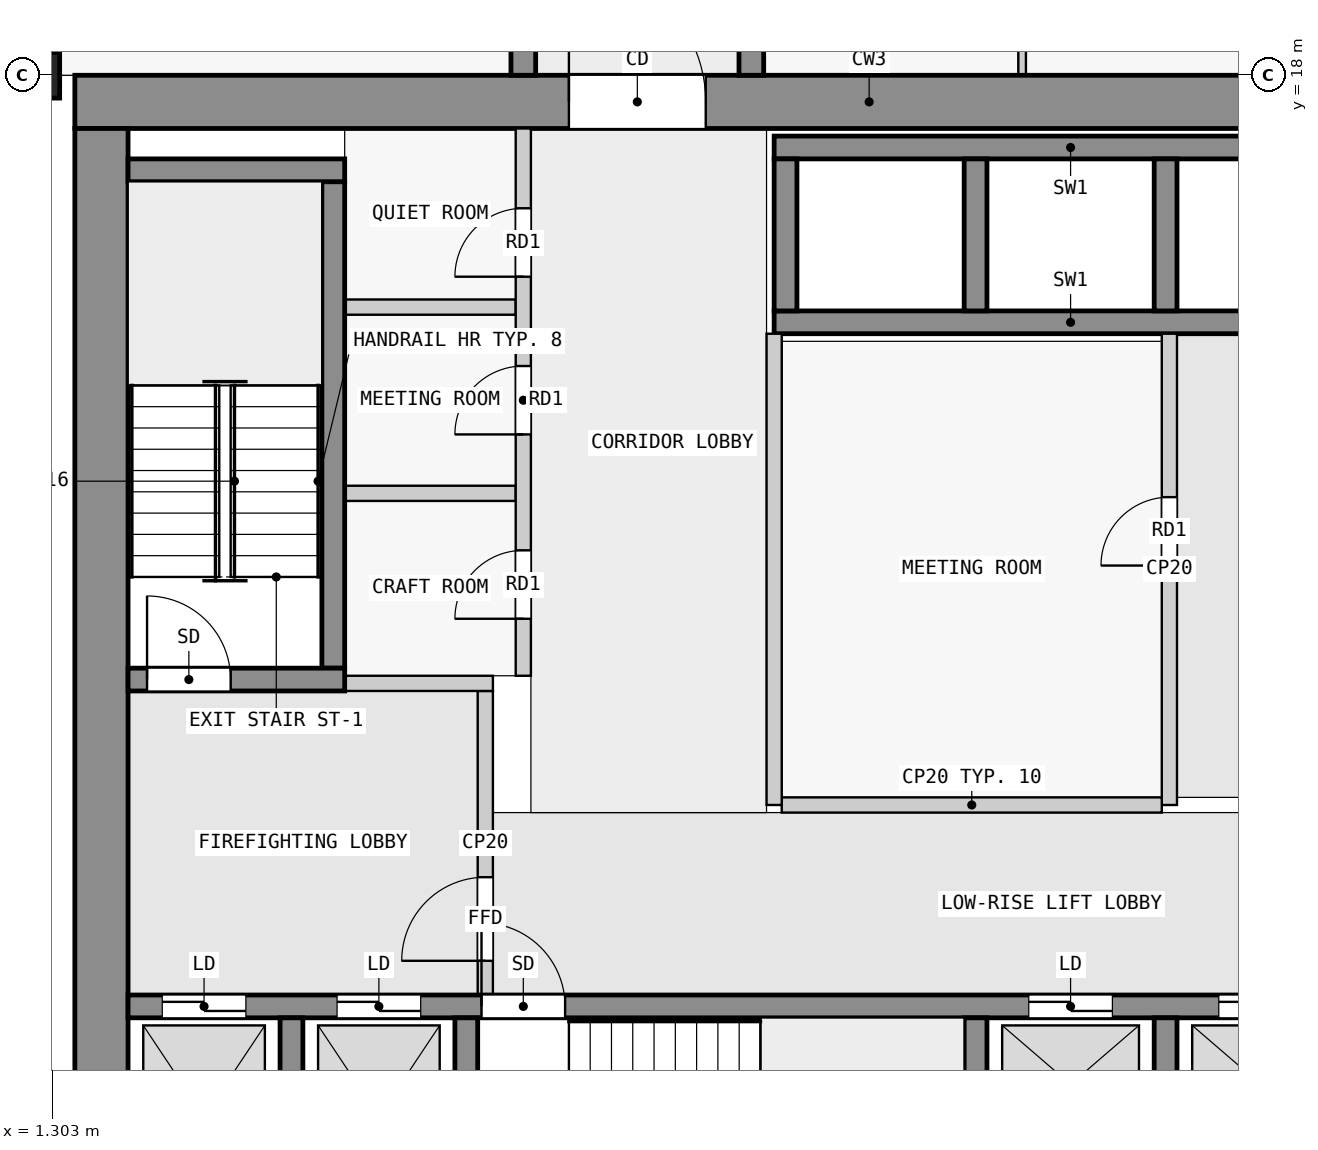
"""IFC4 building model, lengths in metres.
Left out: names, types, materials, properties, quantities, classifications, styles, units other than length and angle.
Written with IfcOpenShell. Run it as: python <this file> out.ifc"""

import sys

from ifc_helpers import new_model, si_unit, direction, frame, frame_2d, origin, origin_2d, place, context, subcontext, project, spatial, rectangle, extrude, element, fill, save


model = new_model("IFC4")
c1 = context("Model", 3, precision=1e-05, world=origin(), true_north=direction((0.0, 1.0)))
c2 = subcontext(c1, "Body", "Model", "MODEL_VIEW")
j1 = project(units=[si_unit("LENGTHUNIT", "METRE"), si_unit("PLANEANGLEUNIT", "RADIAN")], contexts=[c1])
p1 = place(None, origin())
s1 = spatial("IfcSite", under=j1, at=p1, CompositionType="ELEMENT")
p2 = place(p1, origin())
s2 = spatial("IfcBuilding", under=s1, at=p2, CompositionType="ELEMENT")
p3 = place(p2, frame((0.0, 0.0, 85.3)))
s3 = spatial("IfcBuildingStorey", under=s2, at=p3, CompositionType="ELEMENT", Elevation=85.3)
p4 = place(p3, frame((0.7, 18.0, 0.0), z_axis=(0.0, 0.0, 1.0), x_axis=(0.0, 1.0, 0.0)))
e1 = element("IfcColumn", 1, at=p4, inside=s3, PredefinedType="COLUMN", context=c2, shape_type="SweptSolid", body=[
    extrude(rectangle(XDim=0.6, YDim=1.4, at=origin_2d()), origin(), (0.0, 0.0, 1.0), 3.5),
])
p5 = place(p3, frame((1.6, 17.65, 0.0), z_axis=(0.0, 0.0, 1.0), x_axis=(1.0, 0.0, 0.0)))
e2 = element("IfcWall", 2, at=p5, inside=s3, PredefinedType="SHEAR", context=c2, shape_type="SweptSolid", body=[
    extrude(rectangle(XDim=20.9, YDim=0.7, at=frame_2d((10.45, 0.0))), origin(), (0.0, 0.0, 1.0), 3.25),
])
p6 = place(p5, frame((6.5, 0.0, 0.0)))
e3 = element("IfcOpeningElement", 3, at=p6, cuts=e2, PredefinedType="OPENING", context=c2, shape_type="SweptSolid", body=[
    extrude(rectangle(XDim=1.8, YDim=2.1, at=frame_2d((0.9, 1.05))), frame((0.0, 0.36, 0.0), z_axis=(0.0, -1.0, 0.0), x_axis=(1.0, 0.0, 0.0)), (0.0, 0.0, 1.0), 0.72),
])
p7 = place(p3, frame((1.95, 2.5, 0.0), z_axis=(0.0, 0.0, 1.0), x_axis=(0.0, 1.0, 0.0)))
e4 = element("IfcWall", 4, at=p7, inside=s3, PredefinedType="SHEAR", context=c2, shape_type="SweptSolid", body=[
    extrude(rectangle(XDim=14.8, YDim=0.7, at=frame_2d((7.4, 0.0))), origin(), (0.0, 0.0, 1.0), 3.25),
])
for number, where, z_axis, x_axis in (
    (5, (4.45, 2.8, 0.0), (0.0, 0.0, 1.0), (0.0, 1.0, 0.0)),
    (6, (6.75, 2.8, 0.0), (0.0, 0.0, 1.0), (0.0, 1.0, 0.0)),
    (7, (13.45, 2.8, 0.0), (0.0, 0.0, 1.0), (0.0, 1.0, 0.0)),
    (8, (15.95, 2.8, 0.0), (0.0, 0.0, 1.0), (0.0, 1.0, 0.0)),
):
    element("IfcWall", number, at=place(p3, frame(where, z_axis=z_axis, x_axis=x_axis)), inside=s3, PredefinedType="SHEAR", context=c2, shape_type="SweptSolid", body=[
        extrude(rectangle(XDim=2.8, YDim=0.3, at=frame_2d((1.4, 0.0))), origin(), (0.0, 0.0, 1.0), 3.25),
    ])
p8 = place(p3, frame((2.3, 5.75, 0.0), z_axis=(0.0, 0.0, 1.0), x_axis=(1.0, 0.0, 0.0)))
e9 = element("IfcWall", 9, at=p8, inside=s3, PredefinedType="SHEAR", context=c2, shape_type="SweptSolid", body=[
    extrude(rectangle(XDim=18.8, YDim=0.3, at=frame_2d((9.4, 0.0))), origin(), (0.0, 0.0, 1.0), 3.25),
])
p9 = place(p8, frame((4.65, 0.0, 0.0)))
e10 = element("IfcOpeningElement", 10, at=p9, cuts=e9, PredefinedType="OPENING", context=c2, shape_type="SweptSolid", body=[
    extrude(rectangle(XDim=1.1, YDim=2.1, at=frame_2d((0.55, 1.05))), frame((0.0, 0.16, 0.0), z_axis=(0.0, -1.0, 0.0), x_axis=(1.0, 0.0, 0.0)), (0.0, 0.0, 1.0), 0.32),
])
p10 = place(p8, frame((0.45, 0.0, 0.0)))
e11 = element("IfcOpeningElement", 11, at=p10, cuts=e9, PredefinedType="OPENING", context=c2, shape_type="SweptSolid", body=[
    extrude(rectangle(XDim=1.1, YDim=2.1, at=frame_2d((0.55, 1.05))), frame((0.0, 0.16, 0.0), z_axis=(0.0, -1.0, 0.0), x_axis=(1.0, 0.0, 0.0)), (0.0, 0.0, 1.0), 0.32),
])
p11 = place(p8, frame((2.75, 0.0, 0.0)))
e12 = element("IfcOpeningElement", 12, at=p11, cuts=e9, PredefinedType="OPENING", context=c2, shape_type="SweptSolid", body=[
    extrude(rectangle(XDim=1.1, YDim=2.1, at=frame_2d((0.55, 1.05))), frame((0.0, 0.16, 0.0), z_axis=(0.0, -1.0, 0.0), x_axis=(1.0, 0.0, 0.0)), (0.0, 0.0, 1.0), 0.32),
])
p12 = place(p8, frame((11.85, 0.0, 0.0)))
e13 = element("IfcOpeningElement", 13, at=p12, cuts=e9, PredefinedType="OPENING", context=c2, shape_type="SweptSolid", body=[
    extrude(rectangle(XDim=1.1, YDim=2.1, at=frame_2d((0.55, 1.05))), frame((0.0, 0.16, 0.0), z_axis=(0.0, -1.0, 0.0), x_axis=(1.0, 0.0, 0.0)), (0.0, 0.0, 1.0), 0.32),
])
p13 = place(p8, frame((14.35, 0.0, 0.0)))
e14 = element("IfcOpeningElement", 14, at=p13, cuts=e9, PredefinedType="OPENING", context=c2, shape_type="SweptSolid", body=[
    extrude(rectangle(XDim=1.1, YDim=2.1, at=frame_2d((0.55, 1.05))), frame((0.0, 0.16, 0.0), z_axis=(0.0, -1.0, 0.0), x_axis=(1.0, 0.0, 0.0)), (0.0, 0.0, 1.0), 0.32),
])
p14 = place(p8, frame((16.85, 0.0, 0.0)))
e15 = element("IfcOpeningElement", 15, at=p14, cuts=e9, PredefinedType="OPENING", context=c2, shape_type="SweptSolid", body=[
    extrude(rectangle(XDim=1.1, YDim=2.1, at=frame_2d((0.55, 1.05))), frame((0.0, 0.16, 0.0), z_axis=(0.0, -1.0, 0.0), x_axis=(1.0, 0.0, 0.0)), (0.0, 0.0, 1.0), 0.32),
])
p15 = place(p3, frame((2.3, 10.05, 0.0), z_axis=(0.0, 0.0, 1.0), x_axis=(1.0, 0.0, 0.0)))
e16 = element("IfcWall", 16, at=p15, inside=s3, PredefinedType="SHEAR", context=c2, shape_type="SweptSolid", body=[
    extrude(rectangle(XDim=2.85, YDim=0.3, at=frame_2d((1.425, 0.0))), origin(), (0.0, 0.0, 1.0), 3.25),
])
p16 = place(p15, frame((0.25, 0.0, 0.0)))
e17 = element("IfcOpeningElement", 17, at=p16, cuts=e16, PredefinedType="OPENING", context=c2, shape_type="SweptSolid", body=[
    extrude(rectangle(XDim=1.1, YDim=2.1, at=frame_2d((0.55, 1.05))), frame((0.0, 0.16, 0.0), z_axis=(0.0, -1.0, 0.0), x_axis=(1.0, 0.0, 0.0)), (0.0, 0.0, 1.0), 0.32),
])
p17 = place(p3, frame((5.0, 10.2, 0.0), z_axis=(0.0, 0.0, 1.0), x_axis=(0.0, 1.0, 0.0)))
e18 = element("IfcWall", 18, at=p17, inside=s3, PredefinedType="SHEAR", context=c2, shape_type="SweptSolid", body=[
    extrude(rectangle(XDim=6.4, YDim=0.3, at=frame_2d((3.2, 0.0))), origin(), (0.0, 0.0, 1.0), 3.25),
])
p18 = place(p3, frame((2.3, 16.75, 0.0), z_axis=(0.0, 0.0, 1.0), x_axis=(1.0, 0.0, 0.0)))
e19 = element("IfcWall", 19, at=p18, inside=s3, PredefinedType="SHEAR", context=c2, shape_type="SweptSolid", body=[
    extrude(rectangle(XDim=2.85, YDim=0.3, at=frame_2d((1.425, 0.0))), origin(), (0.0, 0.0, 1.0), 3.25),
])
for number, where, z_axis, x_axis in (
    (20, (10.8, 17.05, 0.0), (0.0, 0.0, 1.0), (1.0, 0.0, 0.0)),
    (21, (10.8, 14.75, 0.0), (0.0, 0.0, 1.0), (1.0, 0.0, 0.0)),
):
    element("IfcWall", number, at=place(p3, frame(where, z_axis=z_axis, x_axis=x_axis)), inside=s3, PredefinedType="SHEAR", context=c2, shape_type="SweptSolid", body=[
        extrude(rectangle(XDim=7.8, YDim=0.3, at=frame_2d((3.9, 0.0))), origin(), (0.0, 0.0, 1.0), 3.25),
    ])
for number, where, z_axis, x_axis in (
    (22, (10.95, 14.9, 0.0), (0.0, 0.0, 1.0), (0.0, 1.0, 0.0)),
    (23, (13.45, 14.9, 0.0), (0.0, 0.0, 1.0), (0.0, 1.0, 0.0)),
    (24, (15.95, 14.9, 0.0), (0.0, 0.0, 1.0), (0.0, 1.0, 0.0)),
):
    element("IfcWall", number, at=place(p3, frame(where, z_axis=z_axis, x_axis=x_axis)), inside=s3, PredefinedType="SHEAR", context=c2, shape_type="SweptSolid", body=[
        extrude(rectangle(XDim=2.0, YDim=0.3, at=frame_2d((1.0, 0.0))), origin(), (0.0, 0.0, 1.0), 3.25),
    ])
p19 = place(p3, frame((7.5, 18.0, 0.0), z_axis=(0.0, 0.0, 1.0), x_axis=(0.0, 1.0, 0.0)))
e25 = element("IfcWall", 25, at=p19, inside=s3, PredefinedType="SHEAR", context=c2, shape_type="SweptSolid", body=[
    extrude(rectangle(XDim=27.0, YDim=0.325, at=frame_2d((13.5, 0.0))), origin(), (0.0, 0.0, 1.0), 3.25),
])
p20 = place(p19, frame((1.75, 0.0, 0.0)))
e26 = element("IfcOpeningElement", 26, at=p20, cuts=e25, PredefinedType="OPENING", context=c2, shape_type="SweptSolid", body=[
    extrude(rectangle(XDim=1.0, YDim=2.1, at=frame_2d((0.5, 1.05))), frame((0.0, 0.172, 0.0), z_axis=(0.0, -1.0, 0.0), x_axis=(1.0, 0.0, 0.0)), (0.0, 0.0, 1.0), 0.345),
])
p21 = place(p19, frame((6.25, 0.0, 0.0)))
e27 = element("IfcOpeningElement", 27, at=p21, cuts=e25, PredefinedType="OPENING", context=c2, shape_type="SweptSolid", body=[
    extrude(rectangle(XDim=1.0, YDim=2.1, at=frame_2d((0.5, 1.05))), frame((0.0, 0.172, 0.0), z_axis=(0.0, -1.0, 0.0), x_axis=(1.0, 0.0, 0.0)), (0.0, 0.0, 1.0), 0.345),
])
p22 = place(p19, frame((10.75, 0.0, 0.0)))
e28 = element("IfcOpeningElement", 28, at=p22, cuts=e25, PredefinedType="OPENING", context=c2, shape_type="SweptSolid", body=[
    extrude(rectangle(XDim=1.0, YDim=2.1, at=frame_2d((0.5, 1.05))), frame((0.0, 0.172, 0.0), z_axis=(0.0, -1.0, 0.0), x_axis=(1.0, 0.0, 0.0)), (0.0, 0.0, 1.0), 0.345),
])
p23 = place(p19, frame((15.25, 0.0, 0.0)))
e29 = element("IfcOpeningElement", 29, at=p23, cuts=e25, PredefinedType="OPENING", context=c2, shape_type="SweptSolid", body=[
    extrude(rectangle(XDim=1.0, YDim=2.1, at=frame_2d((0.5, 1.05))), frame((0.0, 0.172, 0.0), z_axis=(0.0, -1.0, 0.0), x_axis=(1.0, 0.0, 0.0)), (0.0, 0.0, 1.0), 0.345),
])
p24 = place(p19, frame((21.35, 0.0, 0.0)))
e30 = element("IfcOpeningElement", 30, at=p24, cuts=e25, PredefinedType="OPENING", context=c2, shape_type="SweptSolid", body=[
    extrude(rectangle(XDim=1.0, YDim=2.1, at=frame_2d((0.5, 1.05))), frame((0.0, 0.172, 0.0), z_axis=(0.0, -1.0, 0.0), x_axis=(1.0, 0.0, 0.0)), (0.0, 0.0, 1.0), 0.345),
])
p25 = place(p3, frame((10.5, 18.0, 0.0), z_axis=(0.0, 0.0, 1.0), x_axis=(0.0, 1.0, 0.0)))
e31 = element("IfcWall", 31, at=p25, inside=s3, PredefinedType="SHEAR", context=c2, shape_type="SweptSolid", body=[
    extrude(rectangle(XDim=27.0, YDim=0.325, at=frame_2d((13.5, 0.0))), origin(), (0.0, 0.0, 1.0), 3.25),
])
p26 = place(p25, frame((4.05, 0.0, 0.0)))
e32 = element("IfcOpeningElement", 32, at=p26, cuts=e31, PredefinedType="OPENING", context=c2, shape_type="SweptSolid", body=[
    extrude(rectangle(XDim=1.0, YDim=2.1, at=frame_2d((0.5, 1.05))), frame((0.0, 0.172, 0.0), z_axis=(0.0, -1.0, 0.0), x_axis=(1.0, 0.0, 0.0)), (0.0, 0.0, 1.0), 0.345),
])
p27 = place(p25, frame((13.05, 0.0, 0.0)))
e33 = element("IfcOpeningElement", 33, at=p27, cuts=e31, PredefinedType="OPENING", context=c2, shape_type="SweptSolid", body=[
    extrude(rectangle(XDim=1.0, YDim=2.1, at=frame_2d((0.5, 1.05))), frame((0.0, 0.172, 0.0), z_axis=(0.0, -1.0, 0.0), x_axis=(1.0, 0.0, 0.0)), (0.0, 0.0, 1.0), 0.345),
])
p28 = place(p25, frame((19.75, 0.0, 0.0)))
e34 = element("IfcOpeningElement", 34, at=p28, cuts=e31, PredefinedType="OPENING", context=c2, shape_type="SweptSolid", body=[
    extrude(rectangle(XDim=1.0, YDim=2.1, at=frame_2d((0.5, 1.05))), frame((0.0, 0.172, 0.0), z_axis=(0.0, -1.0, 0.0), x_axis=(1.0, 0.0, 0.0)), (0.0, 0.0, 1.0), 0.345),
])
p29 = place(p25, frame((23.25, 0.0, 0.0)))
e35 = element("IfcOpeningElement", 35, at=p29, cuts=e31, PredefinedType="OPENING", context=c2, shape_type="SweptSolid", body=[
    extrude(rectangle(XDim=0.9, YDim=2.1, at=frame_2d((0.45, 1.05))), frame((0.0, 0.172, 0.0), z_axis=(0.0, -1.0, 0.0), x_axis=(1.0, 0.0, 0.0)), (0.0, 0.0, 1.0), 0.345),
])
p30 = place(p25, frame((25.45, 0.0, 0.0)))
e36 = element("IfcOpeningElement", 36, at=p30, cuts=e31, PredefinedType="OPENING", context=c2, shape_type="SweptSolid", body=[
    extrude(rectangle(XDim=1.0, YDim=2.1, at=frame_2d((0.5, 1.05))), frame((0.0, 0.172, 0.0), z_axis=(0.0, -1.0, 0.0), x_axis=(1.0, 0.0, 0.0)), (0.0, 0.0, 1.0), 0.345),
])
p31 = place(p3, frame((7.0, 5.9, 0.0), z_axis=(0.0, 0.0, 1.0), x_axis=(0.0, 1.0, 0.0)))
e37 = element("IfcWall", 37, at=p31, inside=s3, PredefinedType="PARTITIONING", context=c2, shape_type="SweptSolid", body=[
    extrude(rectangle(XDim=4.0, YDim=0.2, at=frame_2d((2.0, 0.0))), origin(), (0.0, 0.0, 1.0), 3.25),
])
p32 = place(p31, frame((0.45, 0.0, 0.0)))
e38 = element("IfcOpeningElement", 38, at=p32, cuts=e37, PredefinedType="OPENING", context=c2, shape_type="SweptSolid", body=[
    extrude(rectangle(XDim=1.1, YDim=2.1, at=frame_2d((0.55, 1.05))), frame((0.0, 0.11, 0.0), z_axis=(0.0, -1.0, 0.0), x_axis=(1.0, 0.0, 0.0)), (0.0, 0.0, 1.0), 0.22),
])
p33 = place(p3, frame((5.15, 10.0, 0.0), z_axis=(0.0, 0.0, 1.0), x_axis=(1.0, 0.0, 0.0)))
e39 = element("IfcWall", 39, at=p33, inside=s3, PredefinedType="PARTITIONING", context=c2, shape_type="SweptSolid", body=[
    extrude(rectangle(XDim=1.95, YDim=0.2, at=frame_2d((0.975, 0.0))), origin(), (0.0, 0.0, 1.0), 3.25),
])
p34 = place(p3, frame((10.8, 8.4, 0.0), z_axis=(0.0, 0.0, 1.0), x_axis=(0.0, 1.0, 0.0)))
e40 = element("IfcWall", 40, at=p34, inside=s3, PredefinedType="PARTITIONING", context=c2, shape_type="SweptSolid", body=[
    extrude(rectangle(XDim=6.2, YDim=0.2, at=frame_2d((3.1, 0.0))), origin(), (0.0, 0.0, 1.0), 3.25),
])
p35 = place(p3, frame((10.9, 8.4, 0.0), z_axis=(0.0, 0.0, 1.0), x_axis=(1.0, 0.0, 0.0)))
e41 = element("IfcWall", 41, at=p35, inside=s3, PredefinedType="PARTITIONING", context=c2, shape_type="SweptSolid", body=[
    extrude(rectangle(XDim=5.0, YDim=0.2, at=frame_2d((2.5, 0.0))), origin(), (0.0, 0.0, 1.0), 3.25),
])
p36 = place(p3, frame((16.0, 8.4, 0.0), z_axis=(0.0, 0.0, 1.0), x_axis=(0.0, 1.0, 0.0)))
e42 = element("IfcWall", 42, at=p36, inside=s3, PredefinedType="PARTITIONING", context=c2, shape_type="SweptSolid", body=[
    extrude(rectangle(XDim=6.2, YDim=0.2, at=frame_2d((3.1, 0.0))), origin(), (0.0, 0.0, 1.0), 3.25),
])
p37 = place(p36, frame((3.15, 0.0, 0.0)))
e43 = element("IfcOpeningElement", 43, at=p37, cuts=e42, PredefinedType="OPENING", context=c2, shape_type="SweptSolid", body=[
    extrude(rectangle(XDim=0.9, YDim=2.1, at=frame_2d((0.45, 1.05))), frame((0.0, 0.11, 0.0), z_axis=(0.0, -1.0, 0.0), x_axis=(1.0, 0.0, 0.0)), (0.0, 0.0, 1.0), 0.22),
])
p38 = place(p3, frame((7.5, 10.1, 0.0), z_axis=(0.0, 0.0, 1.0), x_axis=(0.0, 1.0, 0.0)))
e44 = element("IfcWall", 44, at=p38, inside=s3, PredefinedType="PARTITIONING", context=c2, shape_type="SweptSolid", body=[
    extrude(rectangle(XDim=7.2, YDim=0.2, at=frame_2d((3.6, 0.0))), origin(), (0.0, 0.0, 1.0), 3.25),
])
p39 = place(p38, frame((0.75, 0.0, 0.0)))
e45 = element("IfcOpeningElement", 45, at=p39, cuts=e44, PredefinedType="OPENING", context=c2, shape_type="SweptSolid", body=[
    extrude(rectangle(XDim=0.9, YDim=2.1, at=frame_2d((0.45, 1.05))), frame((0.0, 0.11, 0.0), z_axis=(0.0, -1.0, 0.0), x_axis=(1.0, 0.0, 0.0)), (0.0, 0.0, 1.0), 0.22),
])
p40 = place(p38, frame((3.175, 0.0, 0.0)))
e46 = element("IfcOpeningElement", 46, at=p40, cuts=e44, PredefinedType="OPENING", context=c2, shape_type="SweptSolid", body=[
    extrude(rectangle(XDim=0.9, YDim=2.1, at=frame_2d((0.45, 1.05))), frame((0.0, 0.11, 0.0), z_axis=(0.0, -1.0, 0.0), x_axis=(1.0, 0.0, 0.0)), (0.0, 0.0, 1.0), 0.22),
])
p41 = place(p38, frame((5.25, 0.0, 0.0)))
e47 = element("IfcOpeningElement", 47, at=p41, cuts=e44, PredefinedType="OPENING", context=c2, shape_type="SweptSolid", body=[
    extrude(rectangle(XDim=0.9, YDim=2.1, at=frame_2d((0.45, 1.05))), frame((0.0, 0.11, 0.0), z_axis=(0.0, -1.0, 0.0), x_axis=(1.0, 0.0, 0.0)), (0.0, 0.0, 1.0), 0.22),
])
for number, where, z_axis, x_axis in (
    (48, (5.15, 12.5, 0.0), (0.0, 0.0, 1.0), (1.0, 0.0, 0.0)),
    (49, (5.15, 14.95, 0.0), (0.0, 0.0, 1.0), (1.0, 0.0, 0.0)),
):
    element("IfcWall", number, at=place(p3, frame(where, z_axis=z_axis, x_axis=x_axis)), inside=s3, PredefinedType="PARTITIONING", context=c2, shape_type="SweptSolid", body=[
        extrude(rectangle(XDim=2.25, YDim=0.2, at=frame_2d((1.125, 0.0))), origin(), (0.0, 0.0, 1.0), 3.25),
    ])
p42 = place(p3, frame((14.062, 18.0, 0.0), z_axis=(0.0, 0.0, 1.0), x_axis=(0.0, 1.0, 0.0)))
e50 = element("IfcWall", 50, at=p42, inside=s3, PredefinedType="PARTITIONING", context=c2, shape_type="SweptSolid", body=[
    extrude(rectangle(XDim=1.75, YDim=0.1, at=frame_2d((0.875, 0.0))), origin(), (0.0, 0.0, 1.0), 3.25),
])
p43 = place(p32, origin())
e51 = element("IfcDoor", 51, at=p43, inside=s3, OperationType="SINGLE_SWING_LEFT", PredefinedType="DOOR", context=c2, shape_type="SweptSolid", body=[
    extrude(rectangle(XDim=1.1, YDim=2.1, at=frame_2d((0.55, 1.05))), frame((0.0, 0.025, 0.0), z_axis=(0.0, -1.0, 0.0), x_axis=(1.0, 0.0, 0.0)), (0.0, 0.0, 1.0), 0.05),
])
fill(e38, e51)
p44 = place(p16, origin())
e52 = element("IfcDoor", 52, at=p44, inside=s3, OperationType="SINGLE_SWING_RIGHT", PredefinedType="DOOR", context=c2, shape_type="SweptSolid", body=[
    extrude(rectangle(XDim=1.1, YDim=2.1, at=frame_2d((0.55, 1.05))), frame((0.0, 0.025, 0.0), z_axis=(0.0, -1.0, 0.0), x_axis=(1.0, 0.0, 0.0)), (0.0, 0.0, 1.0), 0.05),
])
fill(e17, e52)
p45 = place(p37, origin())
e53 = element("IfcDoor", 53, at=p45, inside=s3, OperationType="SINGLE_SWING_LEFT", PredefinedType="DOOR", context=c2, shape_type="SweptSolid", body=[
    extrude(rectangle(XDim=0.9, YDim=2.1, at=frame_2d((0.45, 1.05))), frame((0.0, 0.025, 0.0), z_axis=(0.0, -1.0, 0.0), x_axis=(1.0, 0.0, 0.0)), (0.0, 0.0, 1.0), 0.05),
])
fill(e43, e53)
p46 = place(p9, origin())
e54 = element("IfcDoor", 54, at=p46, inside=s3, OperationType="SINGLE_SWING_LEFT", PredefinedType="DOOR", context=c2, shape_type="SweptSolid", body=[
    extrude(rectangle(XDim=1.1, YDim=2.1, at=frame_2d((0.55, 1.05))), frame((0.0, 0.025, 0.0), z_axis=(0.0, -1.0, 0.0), x_axis=(1.0, 0.0, 0.0)), (0.0, 0.0, 1.0), 0.05),
])
fill(e10, e54)
p47 = place(p10, origin())
e55 = element("IfcDoor", 55, at=p47, inside=s3, OperationType="DOUBLE_DOOR_SLIDING", PredefinedType="DOOR", context=c2, shape_type="SweptSolid", body=[
    extrude(rectangle(XDim=1.1, YDim=2.1, at=frame_2d((0.55, 1.05))), frame((0.0, 0.025, 0.0), z_axis=(0.0, -1.0, 0.0), x_axis=(1.0, 0.0, 0.0)), (0.0, 0.0, 1.0), 0.05),
])
fill(e11, e55)
p48 = place(p11, origin())
e56 = element("IfcDoor", 56, at=p48, inside=s3, OperationType="DOUBLE_DOOR_SLIDING", PredefinedType="DOOR", context=c2, shape_type="SweptSolid", body=[
    extrude(rectangle(XDim=1.1, YDim=2.1, at=frame_2d((0.55, 1.05))), frame((0.0, 0.025, 0.0), z_axis=(0.0, -1.0, 0.0), x_axis=(1.0, 0.0, 0.0)), (0.0, 0.0, 1.0), 0.05),
])
fill(e12, e56)
p49 = place(p12, origin())
e57 = element("IfcDoor", 57, at=p49, inside=s3, OperationType="DOUBLE_DOOR_SLIDING", PredefinedType="DOOR", context=c2, shape_type="SweptSolid", body=[
    extrude(rectangle(XDim=1.1, YDim=2.1, at=frame_2d((0.55, 1.05))), frame((0.0, 0.025, 0.0), z_axis=(0.0, -1.0, 0.0), x_axis=(1.0, 0.0, 0.0)), (0.0, 0.0, 1.0), 0.05),
])
fill(e13, e57)
p50 = place(p13, origin())
e58 = element("IfcDoor", 58, at=p50, inside=s3, OperationType="DOUBLE_DOOR_SLIDING", PredefinedType="DOOR", context=c2, shape_type="SweptSolid", body=[
    extrude(rectangle(XDim=1.1, YDim=2.1, at=frame_2d((0.55, 1.05))), frame((0.0, 0.025, 0.0), z_axis=(0.0, -1.0, 0.0), x_axis=(1.0, 0.0, 0.0)), (0.0, 0.0, 1.0), 0.05),
])
fill(e14, e58)
p51 = place(p6, origin())
e59 = element("IfcDoor", 59, at=p51, inside=s3, OperationType="DOUBLE_DOOR_SINGLE_SWING", PredefinedType="DOOR", context=c2, shape_type="SweptSolid", body=[
    extrude(rectangle(XDim=1.8, YDim=2.1, at=frame_2d((0.9, 1.05))), frame((0.0, 0.025, 0.0), z_axis=(0.0, -1.0, 0.0), x_axis=(1.0, 0.0, 0.0)), (0.0, 0.0, 1.0), 0.05),
])
fill(e3, e59)
p52 = place(p39, origin())
e60 = element("IfcDoor", 60, at=p52, inside=s3, OperationType="SINGLE_SWING_RIGHT", PredefinedType="DOOR", context=c2, shape_type="SweptSolid", body=[
    extrude(rectangle(XDim=0.9, YDim=2.1, at=frame_2d((0.45, 1.05))), frame((0.0, 0.025, 0.0), z_axis=(0.0, -1.0, 0.0), x_axis=(1.0, 0.0, 0.0)), (0.0, 0.0, 1.0), 0.05),
])
fill(e45, e60)
p53 = place(p40, origin())
e61 = element("IfcDoor", 61, at=p53, inside=s3, OperationType="SINGLE_SWING_RIGHT", PredefinedType="DOOR", context=c2, shape_type="SweptSolid", body=[
    extrude(rectangle(XDim=0.9, YDim=2.1, at=frame_2d((0.45, 1.05))), frame((0.0, 0.025, 0.0), z_axis=(0.0, -1.0, 0.0), x_axis=(1.0, 0.0, 0.0)), (0.0, 0.0, 1.0), 0.05),
])
fill(e46, e61)
p54 = place(p41, origin())
e62 = element("IfcDoor", 62, at=p54, inside=s3, OperationType="SINGLE_SWING_RIGHT", PredefinedType="DOOR", context=c2, shape_type="SweptSolid", body=[
    extrude(rectangle(XDim=0.9, YDim=2.1, at=frame_2d((0.45, 1.05))), frame((0.0, 0.025, 0.0), z_axis=(0.0, -1.0, 0.0), x_axis=(1.0, 0.0, 0.0)), (0.0, 0.0, 1.0), 0.05),
])
fill(e47, e62)
save(model, sys.argv[1])
